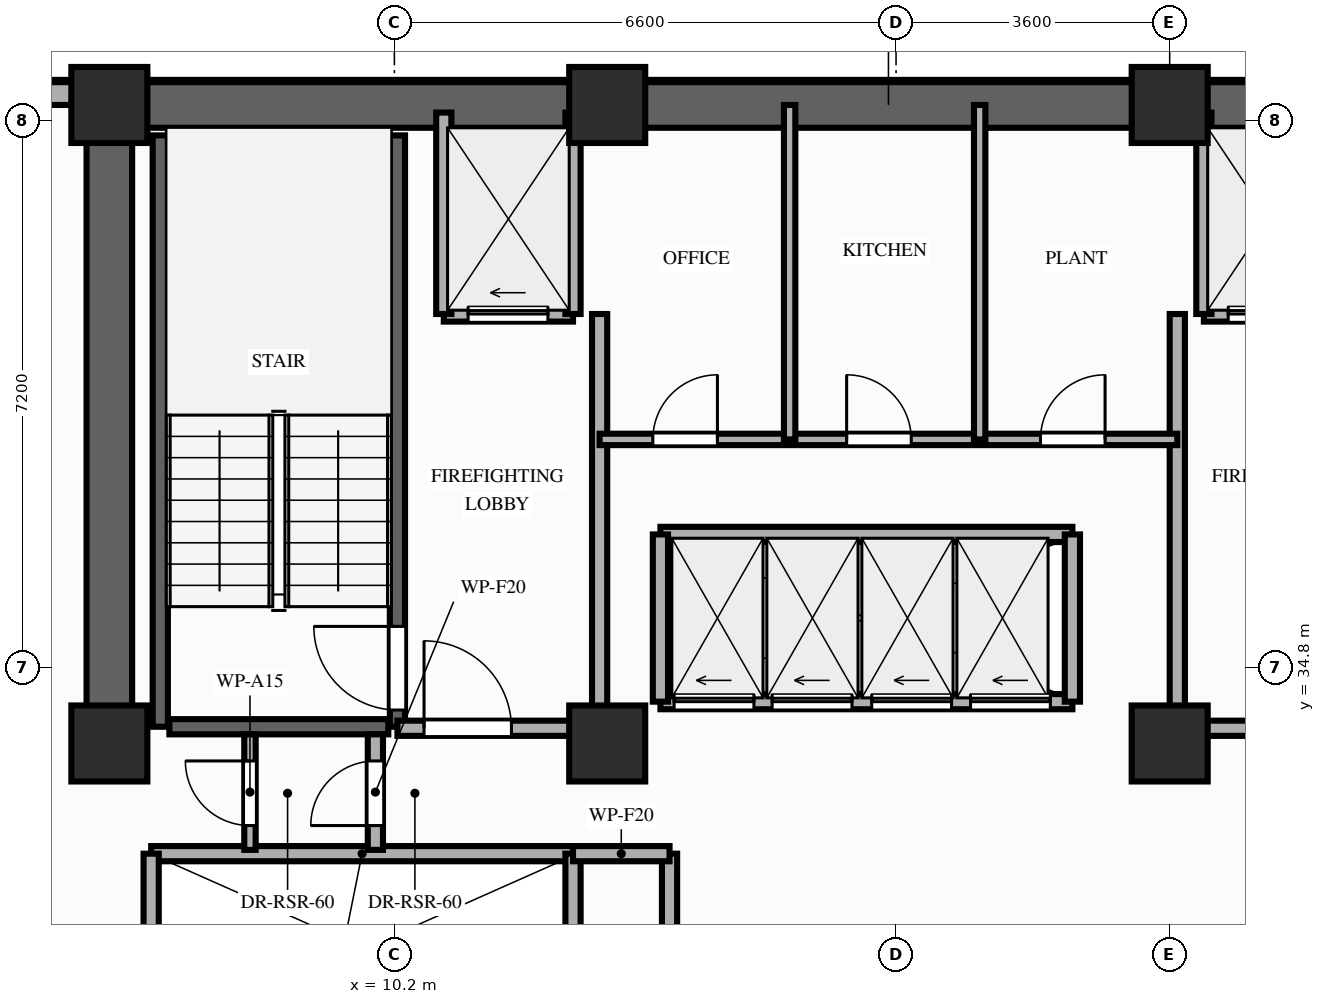
"""IFC4 building model, lengths in metres.
Left out: names, types, materials, properties, quantities, classifications, styles, units other than length and angle.
Written with IfcOpenShell. Run it as: python <this file> out.ifc"""

import sys

from ifc_helpers import new_model, si_unit, direction, frame, frame_2d, origin, origin_2d, place, context, subcontext, project, spatial, rectangle, extrude, element, fill, save


model = new_model("IFC4")
c1 = context("Model", 3, precision=1e-05, world=origin(), true_north=direction((0.0, 1.0)))
c2 = subcontext(c1, "Body", "Model", "MODEL_VIEW")
j1 = project(units=[si_unit("LENGTHUNIT", "METRE"), si_unit("PLANEANGLEUNIT", "RADIAN")], contexts=[c1])
p1 = place(None, origin())
s1 = spatial("IfcSite", under=j1, at=p1, CompositionType="ELEMENT")
p2 = place(p1, origin())
s2 = spatial("IfcBuilding", under=s1, at=p2, CompositionType="ELEMENT")
p3 = place(p2, frame((0.0, 0.0, 133.0)))
s3 = spatial("IfcBuildingStorey", under=s2, at=p3, CompositionType="ELEMENT", Elevation=133.0)
for number, where, z_axis, x_axis in (
    (1, (6.45, 33.8, 0.0), (0.0, 0.0, 1.0), (1.0, 0.0, 0.0)),
    (2, (13.0, 33.8, 0.0), (0.0, 0.0, 1.0), (1.0, 0.0, 0.0)),
    (3, (20.4, 33.8, 0.0), (0.0, 0.0, 1.0), (1.0, 0.0, 0.0)),
    (4, (6.45, 42.2, 0.0), (0.0, 0.0, 1.0), (1.0, 0.0, 0.0)),
    (5, (13.0, 42.2, 0.0), (0.0, 0.0, 1.0), (1.0, 0.0, 0.0)),
    (6, (20.4, 42.2, 0.0), (0.0, 0.0, 1.0), (1.0, 0.0, 0.0)),
):
    element("IfcColumn", number, at=place(p3, frame(where, z_axis=z_axis, x_axis=x_axis)), inside=s3, PredefinedType="COLUMN", context=c2, shape_type="SweptSolid", body=[
        extrude(rectangle(XDim=1.0, YDim=1.0, at=origin_2d()), origin(), (0.0, 0.0, 1.0), 3.2),
    ])
p4 = place(p3, frame((6.0, 42.35, 0.0), z_axis=(0.0, 0.0, 1.0), x_axis=(-1.0, 0.0, 0.0)))
e7 = element("IfcWall", 7, at=p4, inside=s3, PredefinedType="STANDARD", context=c2, shape_type="SweptSolid", body=[
    extrude(rectangle(XDim=2.0, YDim=0.3, at=frame_2d((1.0, 0.0))), origin(), (0.0, 0.0, 1.0), 3.02),
])
p5 = place(p3, frame((6.45, 42.2, 0.0), z_axis=(0.0, 0.0, 1.0), x_axis=(1.0, 0.0, 0.0)))
e8 = element("IfcWall", 8, at=p5, inside=s3, PredefinedType="SHEAR", context=c2, shape_type="SweptSolid", body=[
    extrude(rectangle(XDim=20.45, YDim=0.6, at=frame_2d((10.225, 0.0))), origin(), (0.0, 0.0, 1.0), 3.02),
])
p6 = place(p3, frame((6.45, 33.8, 0.0), z_axis=(0.0, 0.0, 1.0), x_axis=(0.0, 1.0, 0.0)))
e9 = element("IfcWall", 9, at=p6, inside=s3, PredefinedType="SHEAR", context=c2, shape_type="SweptSolid", body=[
    extrude(rectangle(XDim=7.95, YDim=0.6, at=frame_2d((3.975, 0.0))), origin(), (0.0, 0.0, 1.0), 3.02),
])
p7 = place(p3, frame((7.12, 34.02, 0.0), z_axis=(0.0, 0.0, 1.0), x_axis=(0.0, 1.0, 0.0)))
e10 = element("IfcWall", 10, at=p7, inside=s3, PredefinedType="SHEAR", context=c2, shape_type="SweptSolid", body=[
    extrude(rectangle(XDim=7.78, YDim=0.2, at=frame_2d((3.89, 0.0))), origin(), (0.0, 0.0, 1.0), 3.02),
])
p8 = place(p3, frame((10.24, 34.02, 0.0), z_axis=(0.0, 0.0, 1.0), x_axis=(0.0, 1.0, 0.0)))
e11 = element("IfcWall", 11, at=p8, inside=s3, PredefinedType="SHEAR", context=c2, shape_type="SweptSolid", body=[
    extrude(rectangle(XDim=7.78, YDim=0.2, at=frame_2d((3.89, 0.0))), origin(), (0.0, 0.0, 1.0), 3.02),
])
p9 = place(p8, frame((0.22, 0.0, 0.0)))
e12 = element("IfcOpeningElement", 12, at=p9, cuts=e11, PredefinedType="OPENING", context=c2, shape_type="SweptSolid", body=[
    extrude(rectangle(XDim=1.1, YDim=2.15, at=frame_2d((0.55, 1.075))), frame((0.0, 0.11, 0.0), z_axis=(0.0, -1.0, 0.0), x_axis=(1.0, 0.0, 0.0)), (0.0, 0.0, 1.0), 0.22),
])
p10 = place(p3, frame((7.24, 34.02, 0.0), z_axis=(0.0, 0.0, 1.0), x_axis=(1.0, 0.0, 0.0)))
e13 = element("IfcWall", 13, at=p10, inside=s3, PredefinedType="SHEAR", context=c2, shape_type="SweptSolid", body=[
    extrude(rectangle(XDim=2.88, YDim=0.2, at=frame_2d((1.44, 0.0))), origin(), (0.0, 0.0, 1.0), 3.02),
])
p11 = place(p3, frame((7.0, 32.35, 0.0), z_axis=(0.0, 0.0, 1.0), x_axis=(1.0, 0.0, 0.0)))
e14 = element("IfcWall", 14, at=p11, inside=s3, PredefinedType="MOVABLE", context=c2, shape_type="SweptSolid", body=[
    extrude(rectangle(XDim=5.55, YDim=0.2, at=frame_2d((2.775, 0.0))), origin(), (0.0, 0.0, 1.0), 3.02),
])
for number, where, z_axis, x_axis in (
    (15, (7.0, 29.85, 0.0), (0.0, 0.0, 1.0), (0.0, 1.0, 0.0)),
    (16, (12.55, 29.85, 0.0), (0.0, 0.0, 1.0), (0.0, 1.0, 0.0)),
):
    element("IfcWall", number, at=place(p3, frame(where, z_axis=z_axis, x_axis=x_axis)), inside=s3, PredefinedType="MOVABLE", context=c2, shape_type="SweptSolid", body=[
        extrude(rectangle(XDim=2.5, YDim=0.2, at=frame_2d((1.25, 0.0))), origin(), (0.0, 0.0, 1.0), 3.02),
    ])
p12 = place(p3, frame((10.85, 39.45, 0.0), z_axis=(0.0, 0.0, 1.0), x_axis=(1.0, 0.0, 0.0)))
e17 = element("IfcWall", 17, at=p12, inside=s3, PredefinedType="MOVABLE", context=c2, shape_type="SweptSolid", body=[
    extrude(rectangle(XDim=1.7, YDim=0.2, at=frame_2d((0.85, 0.0))), origin(), (0.0, 0.0, 1.0), 3.02),
])
p13 = place(p12, frame((0.32, 0.0, 0.0)))
e18 = element("IfcOpeningElement", 18, at=p13, cuts=e17, PredefinedType="OPENING", context=c2, shape_type="SweptSolid", body=[
    extrude(rectangle(XDim=1.05, YDim=2.15, at=frame_2d((0.525, 1.075))), frame((0.0, 0.11, 0.0), z_axis=(0.0, -1.0, 0.0), x_axis=(1.0, 0.0, 0.0)), (0.0, 0.0, 1.0), 0.22),
])
p14 = place(p3, frame((20.85, 39.45, 0.0), z_axis=(0.0, 0.0, 1.0), x_axis=(1.0, 0.0, 0.0)))
e19 = element("IfcWall", 19, at=p14, inside=s3, PredefinedType="MOVABLE", context=c2, shape_type="SweptSolid", body=[
    extrude(rectangle(XDim=1.7, YDim=0.2, at=frame_2d((0.85, 0.0))), origin(), (0.0, 0.0, 1.0), 3.02),
])
p15 = place(p14, frame((0.32, 0.0, 0.0)))
e20 = element("IfcOpeningElement", 20, at=p15, cuts=e19, PredefinedType="OPENING", context=c2, shape_type="SweptSolid", body=[
    extrude(rectangle(XDim=1.05, YDim=2.15, at=frame_2d((0.525, 1.075))), frame((0.0, 0.11, 0.0), z_axis=(0.0, -1.0, 0.0), x_axis=(1.0, 0.0, 0.0)), (0.0, 0.0, 1.0), 0.22),
])
for number, where, z_axis, x_axis in (
    (21, (10.85, 39.45, 0.0), (0.0, 0.0, 1.0), (0.0, 1.0, 0.0)),
    (22, (12.55, 39.45, 0.0), (0.0, 0.0, 1.0), (0.0, 1.0, 0.0)),
):
    element("IfcWall", number, at=place(p3, frame(where, z_axis=z_axis, x_axis=x_axis)), inside=s3, PredefinedType="MOVABLE", context=c2, shape_type="SweptSolid", body=[
        extrude(rectangle(XDim=2.65, YDim=0.2, at=frame_2d((1.325, 0.0))), origin(), (0.0, 0.0, 1.0), 2.46),
    ])
p16 = place(p3, frame((12.9, 34.0, 0.0), z_axis=(0.0, 0.0, 1.0), x_axis=(0.0, 1.0, 0.0)))
e23 = element("IfcWall", 23, at=p16, inside=s3, PredefinedType="PARTITIONING", context=c2, shape_type="SweptSolid", body=[
    extrude(rectangle(XDim=5.45, YDim=0.2, at=frame_2d((2.725, 0.0))), origin(), (0.0, 0.0, 1.0), 2.46),
])
p17 = place(p3, frame((10.24, 34.0, 0.0), z_axis=(0.0, 0.0, 1.0), x_axis=(1.0, 0.0, 0.0)))
e24 = element("IfcWall", 24, at=p17, inside=s3, PredefinedType="PARTITIONING", context=c2, shape_type="SweptSolid", body=[
    extrude(rectangle(XDim=2.66, YDim=0.2, at=frame_2d((1.33, 0.0))), origin(), (0.0, 0.0, 1.0), 2.46),
])
p18 = place(p17, frame((0.35, 0.0, 0.0)))
e25 = element("IfcOpeningElement", 25, at=p18, cuts=e24, PredefinedType="OPENING", context=c2, shape_type="SweptSolid", body=[
    extrude(rectangle(XDim=1.15, YDim=2.15, at=frame_2d((0.575, 1.075))), frame((0.0, 0.11, 0.0), z_axis=(0.0, -1.0, 0.0), x_axis=(1.0, 0.0, 0.0)), (0.0, 0.0, 1.0), 0.22),
])
p19 = place(p3, frame((20.85, 39.45, 0.0), z_axis=(0.0, 0.0, 1.0), x_axis=(0.0, 1.0, 0.0)))
e26 = element("IfcWall", 26, at=p19, inside=s3, PredefinedType="MOVABLE", context=c2, shape_type="SweptSolid", body=[
    extrude(rectangle(XDim=2.65, YDim=0.2, at=frame_2d((1.325, 0.0))), origin(), (0.0, 0.0, 1.0), 2.46),
])
p20 = place(p3, frame((20.5, 34.0, 0.0), z_axis=(0.0, 0.0, 1.0), x_axis=(0.0, 1.0, 0.0)))
e27 = element("IfcWall", 27, at=p20, inside=s3, PredefinedType="PARTITIONING", context=c2, shape_type="SweptSolid", body=[
    extrude(rectangle(XDim=5.45, YDim=0.2, at=frame_2d((2.725, 0.0))), origin(), (0.0, 0.0, 1.0), 2.46),
])
p21 = place(p3, frame((20.5, 34.0, 0.0), z_axis=(0.0, 0.0, 1.0), x_axis=(1.0, 0.0, 0.0)))
e28 = element("IfcWall", 28, at=p21, inside=s3, PredefinedType="PARTITIONING", context=c2, shape_type="SweptSolid", body=[
    extrude(rectangle(XDim=2.6, YDim=0.2, at=frame_2d((1.3, 0.0))), origin(), (0.0, 0.0, 1.0), 2.46),
])
p22 = place(p21, frame((1.05, 0.0, 0.0)))
e29 = element("IfcOpeningElement", 29, at=p22, cuts=e28, PredefinedType="OPENING", context=c2, shape_type="SweptSolid", body=[
    extrude(rectangle(XDim=1.15, YDim=2.15, at=frame_2d((0.575, 1.075))), frame((0.0, 0.11, 0.0), z_axis=(0.0, -1.0, 0.0), x_axis=(1.0, 0.0, 0.0)), (0.0, 0.0, 1.0), 0.22),
])
p23 = place(p3, frame((9.95, 32.4, 0.0), z_axis=(0.0, 0.0, 1.0), x_axis=(0.0, 1.0, 0.0)))
e30 = element("IfcWall", 30, at=p23, inside=s3, PredefinedType="PARTITIONING", context=c2, shape_type="SweptSolid", body=[
    extrude(rectangle(XDim=1.52, YDim=0.2, at=frame_2d((0.76, 0.0))), origin(), (0.0, 0.0, 1.0), 2.46),
])
p24 = place(p23, frame((0.32, 0.0, 0.0)))
e31 = element("IfcOpeningElement", 31, at=p24, cuts=e30, PredefinedType="OPENING", context=c2, shape_type="SweptSolid", body=[
    extrude(rectangle(XDim=0.85, YDim=2.05, at=frame_2d((0.425, 1.025))), frame((0.0, 0.11, 0.0), z_axis=(0.0, -1.0, 0.0), x_axis=(1.0, 0.0, 0.0)), (0.0, 0.0, 1.0), 0.22),
])
p25 = place(p3, frame((8.3, 32.4, 0.0), z_axis=(0.0, 0.0, 1.0), x_axis=(0.0, 1.0, 0.0)))
e32 = element("IfcWall", 32, at=p25, inside=s3, PredefinedType="PARTITIONING", context=c2, shape_type="SweptSolid", body=[
    extrude(rectangle(XDim=1.52, YDim=0.15, at=frame_2d((0.76, 0.0))), origin(), (0.0, 0.0, 1.0), 2.46),
])
p26 = place(p25, frame((0.32, 0.0, 0.0)))
e33 = element("IfcOpeningElement", 33, at=p26, cuts=e32, PredefinedType="OPENING", context=c2, shape_type="SweptSolid", body=[
    extrude(rectangle(XDim=0.85, YDim=2.05, at=frame_2d((0.425, 1.025))), frame((0.0, 0.085, 0.0), z_axis=(0.0, -1.0, 0.0), x_axis=(1.0, 0.0, 0.0)), (0.0, 0.0, 1.0), 0.17),
])
p27 = place(p3, frame((13.82, 29.85, 0.0), z_axis=(0.0, 0.0, 1.0), x_axis=(0.0, 1.0, 0.0)))
e34 = element("IfcWall", 34, at=p27, inside=s3, PredefinedType="PARTITIONING", context=c2, shape_type="SweptSolid", body=[
    extrude(rectangle(XDim=2.5, YDim=0.2, at=frame_2d((1.25, 0.0))), origin(), (0.0, 0.0, 1.0), 3.02),
])
p28 = place(p3, frame((12.55, 32.35, 0.0), z_axis=(0.0, 0.0, 1.0), x_axis=(1.0, 0.0, 0.0)))
e35 = element("IfcWall", 35, at=p28, inside=s3, PredefinedType="PARTITIONING", context=c2, shape_type="SweptSolid", body=[
    extrude(rectangle(XDim=1.27, YDim=0.2, at=frame_2d((0.635, 0.0))), origin(), (0.0, 0.0, 1.0), 3.02),
])
p29 = place(p3, frame((12.9, 37.8, 0.0), z_axis=(0.0, 0.0, 1.0), x_axis=(1.0, 0.0, 0.0)))
e36 = element("IfcWall", 36, at=p29, inside=s3, PredefinedType="PARTITIONING", context=c2, shape_type="SweptSolid", body=[
    extrude(rectangle(XDim=7.6, YDim=0.15, at=frame_2d((3.8, 0.0))), origin(), (0.0, 0.0, 1.0), 3.02),
])
p30 = place(p29, frame((0.7, 0.0, 0.0)))
e37 = element("IfcOpeningElement", 37, at=p30, cuts=e36, PredefinedType="OPENING", context=c2, shape_type="SweptSolid", body=[
    extrude(rectangle(XDim=0.85, YDim=2.05, at=frame_2d((0.425, 1.025))), frame((0.0, 0.085, 0.0), z_axis=(0.0, -1.0, 0.0), x_axis=(1.0, 0.0, 0.0)), (0.0, 0.0, 1.0), 0.17),
])
p31 = place(p29, frame((3.25, 0.0, 0.0)))
e38 = element("IfcOpeningElement", 38, at=p31, cuts=e36, PredefinedType="OPENING", context=c2, shape_type="SweptSolid", body=[
    extrude(rectangle(XDim=0.85, YDim=2.05, at=frame_2d((0.425, 1.025))), frame((0.0, 0.085, 0.0), z_axis=(0.0, -1.0, 0.0), x_axis=(1.0, 0.0, 0.0)), (0.0, 0.0, 1.0), 0.17),
])
p32 = place(p29, frame((5.8, 0.0, 0.0)))
e39 = element("IfcOpeningElement", 39, at=p32, cuts=e36, PredefinedType="OPENING", context=c2, shape_type="SweptSolid", body=[
    extrude(rectangle(XDim=0.85, YDim=2.05, at=frame_2d((0.425, 1.025))), frame((0.0, 0.085, 0.0), z_axis=(0.0, -1.0, 0.0), x_axis=(1.0, 0.0, 0.0)), (0.0, 0.0, 1.0), 0.17),
])
for number, where, z_axis, x_axis in (
    (40, (15.4, 37.8, 0.0), (0.0, 0.0, 1.0), (0.0, 1.0, 0.0)),
    (41, (17.9, 37.8, 0.0), (0.0, 0.0, 1.0), (0.0, 1.0, 0.0)),
):
    element("IfcWall", number, at=place(p3, frame(where, z_axis=z_axis, x_axis=x_axis)), inside=s3, PredefinedType="PARTITIONING", context=c2, shape_type="SweptSolid", body=[
        extrude(rectangle(XDim=4.4, YDim=0.15, at=frame_2d((2.2, 0.0))), origin(), (0.0, 0.0, 1.0), 2.46),
    ])
p33 = place(p3, frame((13.7, 34.35, 0.0), z_axis=(0.0, 0.0, 1.0), x_axis=(1.0, 0.0, 0.0)))
e42 = element("IfcWall", 42, at=p33, inside=s3, PredefinedType="MOVABLE", context=c2, shape_type="SweptSolid", body=[
    extrude(rectangle(XDim=5.42, YDim=0.2, at=frame_2d((2.71, 0.0))), origin(), (0.0, 0.0, 1.0), 3.02),
])
p34 = place(p33, frame((0.18, 0.0, 0.0)))
e43 = element("IfcOpeningElement", 43, at=p34, cuts=e42, PredefinedType="OPENING", context=c2, shape_type="SweptSolid", body=[
    extrude(rectangle(XDim=1.05, YDim=2.15, at=frame_2d((0.525, 1.075))), frame((0.0, 0.11, 0.0), z_axis=(0.0, -1.0, 0.0), x_axis=(1.0, 0.0, 0.0)), (0.0, 0.0, 1.0), 0.22),
])
p35 = place(p33, frame((1.47, 0.0, 0.0)))
e44 = element("IfcOpeningElement", 44, at=p35, cuts=e42, PredefinedType="OPENING", context=c2, shape_type="SweptSolid", body=[
    extrude(rectangle(XDim=1.05, YDim=2.15, at=frame_2d((0.525, 1.075))), frame((0.0, 0.11, 0.0), z_axis=(0.0, -1.0, 0.0), x_axis=(1.0, 0.0, 0.0)), (0.0, 0.0, 1.0), 0.22),
])
p36 = place(p33, frame((2.78, 0.0, 0.0)))
e45 = element("IfcOpeningElement", 45, at=p36, cuts=e42, PredefinedType="OPENING", context=c2, shape_type="SweptSolid", body=[
    extrude(rectangle(XDim=1.05, YDim=2.15, at=frame_2d((0.525, 1.075))), frame((0.0, 0.11, 0.0), z_axis=(0.0, -1.0, 0.0), x_axis=(1.0, 0.0, 0.0)), (0.0, 0.0, 1.0), 0.22),
])
p37 = place(p33, frame((4.08, 0.0, 0.0)))
e46 = element("IfcOpeningElement", 46, at=p37, cuts=e42, PredefinedType="OPENING", context=c2, shape_type="SweptSolid", body=[
    extrude(rectangle(XDim=1.05, YDim=2.15, at=frame_2d((0.525, 1.075))), frame((0.0, 0.11, 0.0), z_axis=(0.0, -1.0, 0.0), x_axis=(1.0, 0.0, 0.0)), (0.0, 0.0, 1.0), 0.22),
])
p38 = place(p3, frame((13.7, 36.55, 0.0), z_axis=(0.0, 0.0, 1.0), x_axis=(1.0, 0.0, 0.0)))
e47 = element("IfcWall", 47, at=p38, inside=s3, PredefinedType="MOVABLE", context=c2, shape_type="SweptSolid", body=[
    extrude(rectangle(XDim=5.42, YDim=0.2, at=frame_2d((2.71, 0.0))), origin(), (0.0, 0.0, 1.0), 3.02),
])
for number, where, z_axis, x_axis in (
    (48, (13.7, 34.35, 0.0), (0.0, 0.0, 1.0), (0.0, 1.0, 0.0)),
    (49, (19.12, 34.35, 0.0), (0.0, 0.0, 1.0), (0.0, 1.0, 0.0)),
):
    element("IfcWall", number, at=place(p3, frame(where, z_axis=z_axis, x_axis=x_axis)), inside=s3, PredefinedType="MOVABLE", context=c2, shape_type="SweptSolid", body=[
        extrude(rectangle(XDim=2.2, YDim=0.2, at=frame_2d((1.1, 0.0))), origin(), (0.0, 0.0, 1.0), 3.02),
    ])
p39 = place(p9, origin())
e50 = element("IfcDoor", 50, at=p39, inside=s3, OperationType="SINGLE_SWING_RIGHT", PredefinedType="DOOR", context=c2, shape_type="SweptSolid", body=[
    extrude(rectangle(XDim=1.1, YDim=2.15, at=frame_2d((0.55, 1.075))), frame((0.0, 0.025, 0.0), z_axis=(0.0, -1.0, 0.0), x_axis=(1.0, 0.0, 0.0)), (0.0, 0.0, 1.0), 0.05),
])
fill(e12, e50)
p40 = place(p13, origin())
e51 = element("IfcDoor", 51, at=p40, inside=s3, OperationType="SLIDING_TO_LEFT", PredefinedType="DOOR", context=c2, shape_type="SweptSolid", body=[
    extrude(rectangle(XDim=1.05, YDim=2.15, at=frame_2d((0.525, 1.075))), frame((0.0, 0.025, 0.0), z_axis=(0.0, -1.0, 0.0), x_axis=(1.0, 0.0, 0.0)), (0.0, 0.0, 1.0), 0.05),
])
fill(e18, e51)
p41 = place(p15, origin())
e52 = element("IfcDoor", 52, at=p41, inside=s3, OperationType="SLIDING_TO_LEFT", PredefinedType="DOOR", context=c2, shape_type="SweptSolid", body=[
    extrude(rectangle(XDim=1.05, YDim=2.15, at=frame_2d((0.525, 1.075))), frame((0.0, 0.025, 0.0), z_axis=(0.0, -1.0, 0.0), x_axis=(1.0, 0.0, 0.0)), (0.0, 0.0, 1.0), 0.05),
])
fill(e20, e52)
p42 = place(p18, origin())
e53 = element("IfcDoor", 53, at=p42, inside=s3, OperationType="SINGLE_SWING_LEFT", PredefinedType="DOOR", context=c2, shape_type="SweptSolid", body=[
    extrude(rectangle(XDim=1.15, YDim=2.15, at=frame_2d((0.575, 1.075))), frame((0.0, 0.025, 0.0), z_axis=(0.0, -1.0, 0.0), x_axis=(1.0, 0.0, 0.0)), (0.0, 0.0, 1.0), 0.05),
])
fill(e25, e53)
p43 = place(p24, origin())
e54 = element("IfcDoor", 54, at=p43, inside=s3, OperationType="SINGLE_SWING_LEFT", PredefinedType="DOOR", context=c2, shape_type="SweptSolid", body=[
    extrude(rectangle(XDim=0.85, YDim=2.05, at=frame_2d((0.425, 1.025))), frame((0.0, 0.025, 0.0), z_axis=(0.0, -1.0, 0.0), x_axis=(1.0, 0.0, 0.0)), (0.0, 0.0, 1.0), 0.05),
])
fill(e31, e54)
p44 = place(p26, origin())
e55 = element("IfcDoor", 55, at=p44, inside=s3, OperationType="SINGLE_SWING_RIGHT", PredefinedType="DOOR", context=c2, shape_type="SweptSolid", body=[
    extrude(rectangle(XDim=0.85, YDim=2.05, at=frame_2d((0.425, 1.025))), frame((0.0, 0.025, 0.0), z_axis=(0.0, -1.0, 0.0), x_axis=(1.0, 0.0, 0.0)), (0.0, 0.0, 1.0), 0.05),
])
fill(e33, e55)
p45 = place(p30, origin())
e56 = element("IfcDoor", 56, at=p45, inside=s3, OperationType="SINGLE_SWING_RIGHT", PredefinedType="DOOR", context=c2, shape_type="SweptSolid", body=[
    extrude(rectangle(XDim=0.85, YDim=2.05, at=frame_2d((0.425, 1.025))), frame((0.0, 0.025, 0.0), z_axis=(0.0, -1.0, 0.0), x_axis=(1.0, 0.0, 0.0)), (0.0, 0.0, 1.0), 0.05),
])
fill(e37, e56)
p46 = place(p31, origin())
e57 = element("IfcDoor", 57, at=p46, inside=s3, OperationType="SINGLE_SWING_LEFT", PredefinedType="DOOR", context=c2, shape_type="SweptSolid", body=[
    extrude(rectangle(XDim=0.85, YDim=2.05, at=frame_2d((0.425, 1.025))), frame((0.0, 0.025, 0.0), z_axis=(0.0, -1.0, 0.0), x_axis=(1.0, 0.0, 0.0)), (0.0, 0.0, 1.0), 0.05),
])
fill(e38, e57)
p47 = place(p32, origin())
e58 = element("IfcDoor", 58, at=p47, inside=s3, OperationType="SINGLE_SWING_RIGHT", PredefinedType="DOOR", context=c2, shape_type="SweptSolid", body=[
    extrude(rectangle(XDim=0.85, YDim=2.05, at=frame_2d((0.425, 1.025))), frame((0.0, 0.025, 0.0), z_axis=(0.0, -1.0, 0.0), x_axis=(1.0, 0.0, 0.0)), (0.0, 0.0, 1.0), 0.05),
])
fill(e39, e58)
p48 = place(p34, origin())
e59 = element("IfcDoor", 59, at=p48, inside=s3, OperationType="SLIDING_TO_LEFT", PredefinedType="DOOR", context=c2, shape_type="SweptSolid", body=[
    extrude(rectangle(XDim=1.05, YDim=2.15, at=frame_2d((0.525, 1.075))), frame((0.0, 0.025, 0.0), z_axis=(0.0, -1.0, 0.0), x_axis=(1.0, 0.0, 0.0)), (0.0, 0.0, 1.0), 0.05),
])
fill(e43, e59)
p49 = place(p35, origin())
e60 = element("IfcDoor", 60, at=p49, inside=s3, OperationType="SLIDING_TO_LEFT", PredefinedType="DOOR", context=c2, shape_type="SweptSolid", body=[
    extrude(rectangle(XDim=1.05, YDim=2.15, at=frame_2d((0.525, 1.075))), frame((0.0, 0.025, 0.0), z_axis=(0.0, -1.0, 0.0), x_axis=(1.0, 0.0, 0.0)), (0.0, 0.0, 1.0), 0.05),
])
fill(e44, e60)
p50 = place(p36, origin())
e61 = element("IfcDoor", 61, at=p50, inside=s3, OperationType="SLIDING_TO_LEFT", PredefinedType="DOOR", context=c2, shape_type="SweptSolid", body=[
    extrude(rectangle(XDim=1.05, YDim=2.15, at=frame_2d((0.525, 1.075))), frame((0.0, 0.025, 0.0), z_axis=(0.0, -1.0, 0.0), x_axis=(1.0, 0.0, 0.0)), (0.0, 0.0, 1.0), 0.05),
])
fill(e45, e61)
p51 = place(p37, origin())
e62 = element("IfcDoor", 62, at=p51, inside=s3, OperationType="SLIDING_TO_LEFT", PredefinedType="DOOR", context=c2, shape_type="SweptSolid", body=[
    extrude(rectangle(XDim=1.05, YDim=2.15, at=frame_2d((0.525, 1.075))), frame((0.0, 0.025, 0.0), z_axis=(0.0, -1.0, 0.0), x_axis=(1.0, 0.0, 0.0)), (0.0, 0.0, 1.0), 0.05),
])
fill(e46, e62)
save(model, sys.argv[1])
